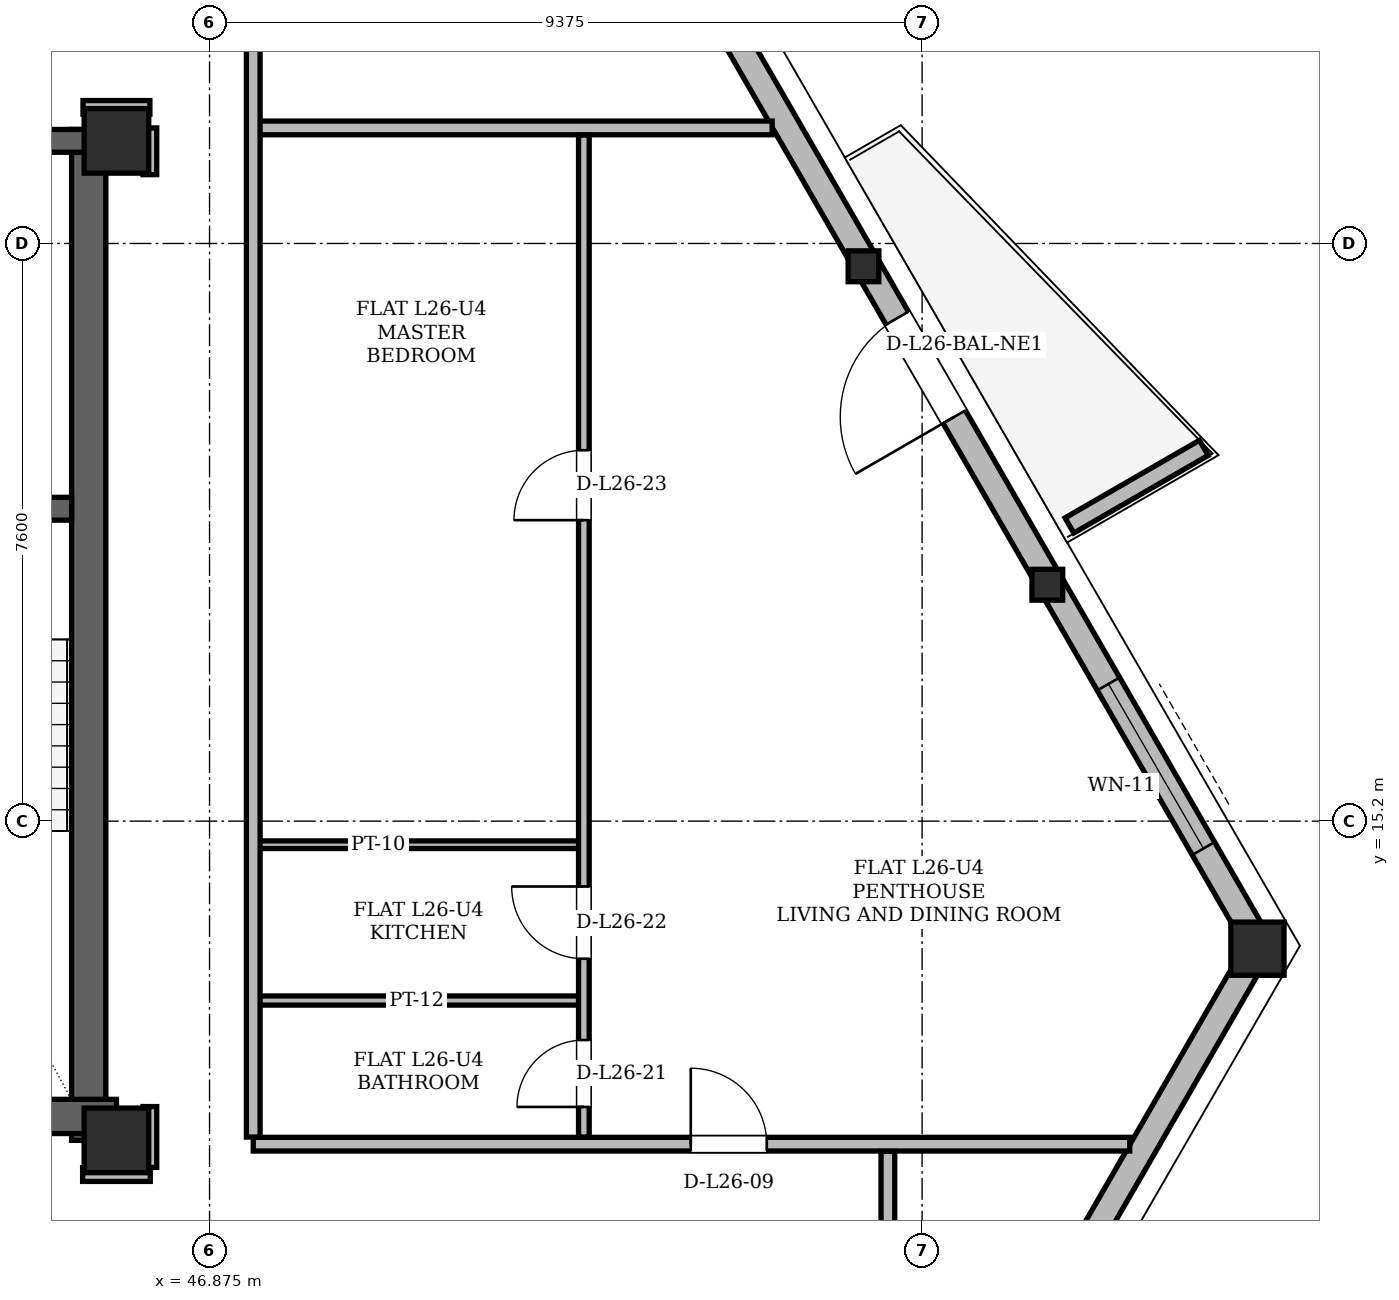
"""IFC4 building model, lengths in metres.
Left out: names, types, materials, properties, quantities, classifications, styles, units other than length and angle.
Written with IfcOpenShell. Run it as: python <this file> out.ifc"""

import sys

from ifc_helpers import new_model, si_unit, direction, frame, frame_2d, origin, origin_2d, place, context, subcontext, project, spatial, polyline, rectangle, hollow_rectangle, i_section, outline, extrude, element, fill, save


model = new_model("IFC4")
c1 = context("Model", 3, precision=1e-05, world=origin(), true_north=direction((0.0, 1.0)))
c2 = subcontext(c1, "Body", "Model", "MODEL_VIEW")
j1 = project(units=[si_unit("LENGTHUNIT", "METRE"), si_unit("PLANEANGLEUNIT", "RADIAN")], contexts=[c1])
p1 = place(None, origin())
s1 = spatial("IfcSite", under=j1, at=p1, CompositionType="ELEMENT")
p2 = place(p1, origin())
s2 = spatial("IfcBuilding", under=s1, at=p2, CompositionType="ELEMENT")
p3 = place(p2, frame((0.0, 0.0, 100.5)))
s3 = spatial("IfcBuildingStorey", under=s2, at=p3, CompositionType="ELEMENT", Elevation=100.5)
for number, where, z_axis, x_axis in (
    (1, (45.65, 11.0, 0.0), (0.0, 0.0, 1.0), (1.0, 0.0, 0.0)),
    (2, (45.65, 24.15, 0.0), (0.0, 0.0, 1.0), (1.0, 0.0, 0.0)),
):
    element("IfcColumn", number, at=place(p3, frame(where, z_axis=z_axis, x_axis=x_axis)), inside=s3, PredefinedType="COLUMN", context=c2, shape_type="SweptSolid", body=[
        extrude(hollow_rectangle(XDim=0.85, YDim=0.85, WallThickness=0.07, at=origin_2d()), origin(), (0.0, 0.0, 1.0), 3.6),
    ])
p4 = place(p3, frame((60.69, 13.561, 0.004), z_axis=(-0.015495232053, -0.021611771021, 0.999646352035), x_axis=(0.812696104859, -0.582687773295, 0.0)))
e3 = element("IfcColumn", 3, at=p4, inside=s3, PredefinedType="COLUMN", context=c2, shape_type="SweptSolid", body=[
    extrude(hollow_rectangle(XDim=0.7, YDim=0.7, WallThickness=0.055, at=origin_2d()), origin(), (0.0, 0.0, 1.0), 3.592),
])
p5 = place(p3, frame((57.929, 18.344, 0.004), z_axis=(-0.01726279285, -0.018554104126, 0.999678819023), x_axis=(0.732124530996, -0.681170809059, 0.0)))
e4 = element("IfcColumn", 4, at=p5, inside=s3, PredefinedType="COLUMN", context=c2, shape_type="SweptSolid", body=[
    extrude(i_section(OverallWidth=0.404, OverallDepth=0.406, WebThickness=0.027, FlangeThickness=0.044, at=origin_2d()), origin(), (0.0, 0.0, 1.0), 3.592),
])
p6 = place(p3, frame((55.513, 22.528, 0.004), z_axis=(-0.018758346864, -0.015903815819, 0.999697550795), x_axis=(0.646685251635, -0.762756963467, 0.0)))
e5 = element("IfcColumn", 5, at=p6, inside=s3, PredefinedType="COLUMN", context=c2, shape_type="SweptSolid", body=[
    extrude(i_section(OverallWidth=0.404, OverallDepth=0.406, WebThickness=0.027, FlangeThickness=0.044, at=origin_2d()), origin(), (0.0, 0.0, 1.0), 3.592),
])
p7 = place(p3, frame((45.285, 11.0, 0.0), z_axis=(0.0, 0.0, 1.0), x_axis=(0.0, 1.0, 0.0)))
e6 = element("IfcWall", 6, at=p7, inside=s3, PredefinedType="SHEAR", context=c2, shape_type="SweptSolid", body=[
    extrude(rectangle(XDim=13.3, YDim=0.45, at=frame_2d((6.65, 0.0))), origin(), (0.0, 0.0, 1.0), 3.36),
])
p8 = place(p3, frame((38.55, 11.315, 0.0), z_axis=(0.0, 0.0, 1.0), x_axis=(1.0, 0.0, 0.0)))
e7 = element("IfcWall", 7, at=p8, inside=s3, PredefinedType="SHEAR", context=c2, shape_type="SweptSolid", body=[
    extrude(rectangle(XDim=7.1, YDim=0.45, at=frame_2d((3.55, 0.0))), origin(), (0.0, 0.0, 1.0), 3.36),
])
p9 = place(p3, frame((29.65, 24.15, 0.0), z_axis=(0.0, 0.0, 1.0), x_axis=(1.0, 0.0, 0.0)))
e8 = element("IfcWall", 8, at=p9, inside=s3, PredefinedType="SHEAR", context=c2, shape_type="SweptSolid", body=[
    extrude(rectangle(XDim=15.7, YDim=0.3, at=frame_2d((7.85, 0.0))), origin(), (0.0, 0.0, 1.0), 3.36),
])
p10 = place(p9, frame((1.7, 0.0, 0.0)))
e9 = element("IfcOpeningElement", 9, at=p10, cuts=e8, PredefinedType="OPENING", context=c2, shape_type="SweptSolid", body=[
    extrude(rectangle(XDim=1.2, YDim=2.2, at=frame_2d((0.6, 1.1))), frame((0.0, 0.15, 0.0), z_axis=(0.0, -1.0, 0.0), x_axis=(1.0, 0.0, 0.0)), (0.0, 0.0, 1.0), 0.3),
])
p11 = place(p9, frame((12.8, 0.0, 0.0)))
e10 = element("IfcOpeningElement", 10, at=p11, cuts=e8, PredefinedType="OPENING", context=c2, shape_type="SweptSolid", body=[
    extrude(rectangle(XDim=1.2, YDim=2.2, at=frame_2d((0.6, 1.1))), frame((0.0, 0.15, 0.0), z_axis=(0.0, -1.0, 0.0), x_axis=(1.0, 0.0, 0.0)), (0.0, 0.0, 1.0), 0.3),
])
p12 = place(p9, frame((7.4, 0.0, 0.0)))
e11 = element("IfcOpeningElement", 11, at=p12, cuts=e8, PredefinedType="OPENING", context=c2, shape_type="SweptSolid", body=[
    extrude(rectangle(XDim=0.9, YDim=2.05, at=frame_2d((0.45, 1.025))), frame((0.0, 0.15, 0.0), z_axis=(0.0, -1.0, 0.0), x_axis=(1.0, 0.0, 0.0)), (0.0, 0.0, 1.0), 0.3),
])
p13 = place(p3, frame((41.05, 19.31, 0.0), z_axis=(0.0, 0.0, 1.0), x_axis=(1.0, 0.0, 0.0)))
e12 = element("IfcWall", 12, at=p13, inside=s3, PredefinedType="SHEAR", context=c2, shape_type="SweptSolid", body=[
    extrude(rectangle(XDim=4.01, YDim=0.3, at=frame_2d((2.005, 0.0))), origin(), (0.0, 0.0, 1.0), 3.36),
])
p14 = place(p13, frame((1.6, 0.0, 0.0)))
e13 = element("IfcOpeningElement", 13, at=p14, cuts=e12, PredefinedType="OPENING", context=c2, shape_type="SweptSolid", body=[
    extrude(rectangle(XDim=1.4, YDim=2.2, at=frame_2d((0.7, 1.1))), frame((0.0, 0.15, 0.0), z_axis=(0.0, -1.0, 0.0), x_axis=(1.0, 0.0, 0.0)), (0.0, 0.0, 1.0), 0.3),
])
p15 = place(p3, frame((54.758, 3.286, 0.0), z_axis=(0.0, 0.0, 1.0), x_axis=(0.4999967785, 0.866027263711, 0.0)))
e14 = element("IfcWall", 14, at=p15, inside=s3, PredefinedType="SOLIDWALL", context=c2, shape_type="SweptSolid", body=[
    extrude(rectangle(XDim=11.864, YDim=0.34, at=frame_2d((5.932, 0.0))), origin(), (0.0, 0.0, 1.0), 2.578),
])
p16 = place(p3, frame((60.69, 13.561, 0.0), z_axis=(0.0, 0.0, 1.0), x_axis=(-0.500002056916, 0.86602421622, 0.0)))
e15 = element("IfcWall", 15, at=p16, inside=s3, PredefinedType="SOLIDWALL", context=c2, shape_type="SweptSolid", body=[
    extrude(rectangle(XDim=34.516, YDim=0.34, at=frame_2d((17.258, 0.0))), origin(), (0.0, 0.0, 1.0), 2.578),
])
p17 = place(p16, frame((8.034, 0.0, 0.0)))
e16 = element("IfcOpeningElement", 16, at=p17, cuts=e15, PredefinedType="OPENING", context=c2, shape_type="SweptSolid", body=[
    extrude(rectangle(XDim=1.5, YDim=2.2, at=frame_2d((0.75, 1.1))), frame((0.0, 0.17, 0.0), z_axis=(0.0, -1.0, 0.0), x_axis=(1.0, 0.0, 0.0)), (0.0, 0.0, 1.0), 0.34),
])
p18 = place(p16, frame((26.647, 0.0, 0.0)))
e17 = element("IfcOpeningElement", 17, at=p18, cuts=e15, PredefinedType="OPENING", context=c2, shape_type="SweptSolid", body=[
    extrude(rectangle(XDim=1.5, YDim=2.2, at=frame_2d((0.75, 1.1))), frame((0.0, 0.17, 0.0), z_axis=(0.0, -1.0, 0.0), x_axis=(1.0, 0.0, 0.0)), (0.0, 0.0, 1.0), 0.34),
])
p19 = place(p16, frame((1.477, 0.0, 0.85)))
e18 = element("IfcOpeningElement", 18, at=p19, cuts=e15, PredefinedType="OPENING", context=c2, shape_type="SweptSolid", body=[
    extrude(rectangle(XDim=2.5, YDim=1.618, at=frame_2d((1.25, 0.809))), frame((0.0, 0.17, 0.0), z_axis=(0.0, -1.0, 0.0), x_axis=(1.0, 0.0, 0.0)), (0.0, 0.0, 1.0), 0.34),
])
p20 = place(p16, frame((16.107, 0.0, 0.85)))
e19 = element("IfcOpeningElement", 19, at=p20, cuts=e15, PredefinedType="OPENING", context=c2, shape_type="SweptSolid", body=[
    extrude(rectangle(XDim=1.4, YDim=1.6, at=frame_2d((0.7, 0.8))), frame((0.0, 0.17, 0.0), z_axis=(0.0, -1.0, 0.0), x_axis=(1.0, 0.0, 0.0)), (0.0, 0.0, 1.0), 0.34),
])
p21 = place(p16, frame((30.693, 0.0, 0.85)))
e20 = element("IfcOpeningElement", 20, at=p21, cuts=e15, PredefinedType="OPENING", context=c2, shape_type="SweptSolid", body=[
    extrude(rectangle(XDim=2.5, YDim=1.618, at=frame_2d((1.25, 0.809))), frame((0.0, 0.17, 0.0), z_axis=(0.0, -1.0, 0.0), x_axis=(1.0, 0.0, 0.0)), (0.0, 0.0, 1.0), 0.34),
])
p22 = place(p3, frame((58.188, 19.09, 0.0), z_axis=(0.0, 0.0, 1.0), x_axis=(0.866012356593, 0.500022597718, 0.0)))
e21 = element("IfcWall", 21, at=p22, inside=s3, PredefinedType="PARAPET", context=c2, shape_type="SweptSolid", body=[
    extrude(outline(polyline([(0.0, 0.0), (2.042, 0.0), (2.042, 1.1), (0.0, 1.32), (0.0, 0.0)])), frame((0.0, 0.115, 0.0), z_axis=(0.0, -1.0, 0.0), x_axis=(1.0, 0.0, 0.0)), (0.0, 0.0, 1.0), 0.23),
])
p23 = place(p3, frame((45.205, 10.55, 0.0), z_axis=(0.0, 0.0, 1.0), x_axis=(1.0, 0.0, 0.0)))
e22 = element("IfcWall", 22, at=p23, inside=s3, PredefinedType="PARTITIONING", context=c2, shape_type="SweptSolid", body=[
    extrude(rectangle(XDim=0.89, YDim=0.18, at=frame_2d((0.445, 0.0))), origin(), (0.0, 0.0, 1.0), 3.36),
])
p24 = place(p3, frame((47.45, 10.95, 0.0), z_axis=(0.0, 0.0, 1.0), x_axis=(1.0, 0.0, 0.0)))
e23 = element("IfcWall", 23, at=p24, inside=s3, PredefinedType="PARTITIONING", context=c2, shape_type="SweptSolid", body=[
    extrude(rectangle(XDim=11.532, YDim=0.18, at=frame_2d((5.766, 0.0))), origin(), (0.0, 0.0, 1.0), 3.36),
])
p25 = place(p24, frame((5.756, 0.0, 0.0)))
e24 = element("IfcOpeningElement", 24, at=p25, cuts=e23, PredefinedType="OPENING", context=c2, shape_type="SweptSolid", body=[
    extrude(rectangle(XDim=1.0, YDim=2.18, at=frame_2d((0.5, 1.09))), frame((0.0, 0.09, 0.0), z_axis=(0.0, -1.0, 0.0), x_axis=(1.0, 0.0, 0.0)), (0.0, 0.0, 1.0), 0.18),
])
p26 = place(p3, frame((47.4, 12.84, 0.0), z_axis=(0.0, 0.0, 1.0), x_axis=(1.0, 0.0, 0.0)))
e25 = element("IfcWall", 25, at=p26, inside=s3, PredefinedType="PARTITIONING", context=c2, shape_type="SweptSolid", body=[
    extrude(rectangle(XDim=4.4, YDim=0.12, at=frame_2d((2.2, 0.0))), origin(), (0.0, 0.0, 1.0), 3.36),
])
p27 = place(p3, frame((47.4, 14.89, 0.0), z_axis=(0.0, 0.0, 1.0), x_axis=(1.0, 0.0, 0.0)))
e26 = element("IfcWall", 26, at=p27, inside=s3, PredefinedType="PARTITIONING", context=c2, shape_type="SweptSolid", body=[
    extrude(rectangle(XDim=4.4, YDim=0.1, at=frame_2d((2.2, 0.0))), origin(), (0.0, 0.0, 1.0), 2.946),
])
p28 = place(p3, frame((47.45, 24.32, 0.0), z_axis=(0.0, 0.0, 1.0), x_axis=(1.0, 0.0, 0.0)))
e27 = element("IfcWall", 27, at=p28, inside=s3, PredefinedType="PARTITIONING", context=c2, shape_type="SweptSolid", body=[
    extrude(rectangle(XDim=6.827, YDim=0.18, at=frame_2d((3.414, 0.0))), origin(), (0.0, 0.0, 1.0), 3.36),
])
p29 = place(p3, frame((45.21, 24.59, 0.0), z_axis=(0.0, 0.0, 1.0), x_axis=(1.0, 0.0, 0.0)))
e28 = element("IfcWall", 28, at=p29, inside=s3, PredefinedType="PARTITIONING", context=c2, shape_type="SweptSolid", body=[
    extrude(rectangle(XDim=0.88, YDim=0.18, at=frame_2d((0.44, 0.0))), origin(), (0.0, 0.0, 1.0), 2.814),
])
p30 = place(p3, frame((46.09, 10.644, 0.0), z_axis=(0.0, 0.0, 1.0), x_axis=(0.0, 1.0, 0.0)))
e29 = element("IfcWall", 29, at=p30, inside=s3, PredefinedType="PARTITIONING", context=c2, shape_type="SweptSolid", body=[
    extrude(rectangle(XDim=0.801, YDim=0.18, at=frame_2d((0.4, 0.0))), origin(), (0.0, 0.0, 1.0), 2.814),
])
p31 = place(p3, frame((46.09, 23.705, 0.0), z_axis=(0.0, 0.0, 1.0), x_axis=(0.0, 1.0, 0.0)))
e30 = element("IfcWall", 30, at=p31, inside=s3, PredefinedType="PARTITIONING", context=c2, shape_type="SweptSolid", body=[
    extrude(rectangle(XDim=0.615, YDim=0.18, at=frame_2d((0.308, 0.0))), origin(), (0.0, 0.0, 1.0), 2.946),
])
p32 = place(p3, frame((47.45, 11.044, 0.0), z_axis=(0.0, 0.0, 1.0), x_axis=(0.0, 1.0, 0.0)))
e31 = element("IfcWall", 31, at=p32, inside=s3, PredefinedType="PARTITIONING", context=c2, shape_type="SweptSolid", body=[
    extrude(rectangle(XDim=14.832, YDim=0.18, at=frame_2d((7.416, 0.0))), origin(), (0.0, 0.0, 1.0), 2.814),
])
p33 = place(p3, frame((51.8, 11.044, 0.0), z_axis=(0.0, 0.0, 1.0), x_axis=(0.0, 1.0, 0.0)))
e32 = element("IfcWall", 32, at=p33, inside=s3, PredefinedType="PARTITIONING", context=c2, shape_type="SweptSolid", body=[
    extrude(rectangle(XDim=13.182, YDim=0.14, at=frame_2d((6.591, 0.0))), origin(), (0.0, 0.0, 1.0), 2.814),
])
p34 = place(p33, frame((0.396, 0.0, 0.0)))
e33 = element("IfcOpeningElement", 33, at=p34, cuts=e32, PredefinedType="OPENING", context=c2, shape_type="SweptSolid", body=[
    extrude(rectangle(XDim=0.88, YDim=2.08, at=frame_2d((0.44, 1.04))), frame((0.0, 0.07, 0.0), z_axis=(0.0, -1.0, 0.0), x_axis=(1.0, 0.0, 0.0)), (0.0, 0.0, 1.0), 0.14),
])
p35 = place(p33, frame((2.346, 0.0, 0.0)))
e34 = element("IfcOpeningElement", 34, at=p35, cuts=e32, PredefinedType="OPENING", context=c2, shape_type="SweptSolid", body=[
    extrude(rectangle(XDim=0.95, YDim=2.1, at=frame_2d((0.475, 1.05))), frame((0.0, 0.07, 0.0), z_axis=(0.0, -1.0, 0.0), x_axis=(1.0, 0.0, 0.0)), (0.0, 0.0, 1.0), 0.14),
])
p36 = place(p33, frame((8.116, 0.0, 0.0)))
e35 = element("IfcOpeningElement", 35, at=p36, cuts=e32, PredefinedType="OPENING", context=c2, shape_type="SweptSolid", body=[
    extrude(rectangle(XDim=0.92, YDim=2.12, at=frame_2d((0.46, 1.06))), frame((0.0, 0.07, 0.0), z_axis=(0.0, -1.0, 0.0), x_axis=(1.0, 0.0, 0.0)), (0.0, 0.0, 1.0), 0.14),
])
p37 = place(p3, frame((55.8, 9.394, 0.0), z_axis=(0.0, 0.0, 1.0), x_axis=(0.0, 1.0, 0.0)))
e36 = element("IfcWall", 36, at=p37, inside=s3, PredefinedType="PARTITIONING", context=c2, shape_type="SweptSolid", body=[
    extrude(rectangle(XDim=1.462, YDim=0.18, at=frame_2d((0.731, 0.0))), origin(), (0.0, 0.0, 1.0), 3.36),
])
p38 = place(p17, origin())
e37 = element("IfcDoor", 37, at=p38, inside=s3, OperationType="SINGLE_SWING_LEFT", PredefinedType="DOOR", context=c2, shape_type="SweptSolid", body=[
    extrude(rectangle(XDim=1.5, YDim=2.2, at=frame_2d((0.75, 1.1))), frame((0.0, 0.025, 0.0), z_axis=(0.0, -1.0, 0.0), x_axis=(1.0, 0.0, 0.0)), (0.0, 0.0, 1.0), 0.05),
])
fill(e16, e37)
p39 = place(p19, origin())
e38 = element("IfcWindow", 38, at=p39, inside=s3, PartitioningType="SINGLE_PANEL", PredefinedType="WINDOW", context=c2, shape_type="SweptSolid", body=[
    extrude(rectangle(XDim=2.5, YDim=1.618, at=frame_2d((1.25, 0.809))), frame((0.0, 0.03, 0.0), z_axis=(0.0, -1.0, 0.0), x_axis=(1.0, 0.0, 0.0)), (0.0, 0.0, 1.0), 0.06),
])
fill(e18, e38)
p40 = place(p25, origin())
e39 = element("IfcDoor", 39, at=p40, inside=s3, OperationType="SINGLE_SWING_LEFT", PredefinedType="DOOR", context=c2, shape_type="SweptSolid", body=[
    extrude(rectangle(XDim=1.0, YDim=2.18, at=frame_2d((0.5, 1.09))), frame((0.0, 0.025, 0.0), z_axis=(0.0, -1.0, 0.0), x_axis=(1.0, 0.0, 0.0)), (0.0, 0.0, 1.0), 0.05),
])
fill(e24, e39)
p41 = place(p34, origin())
e40 = element("IfcDoor", 40, at=p41, inside=s3, OperationType="SINGLE_SWING_LEFT", PredefinedType="DOOR", context=c2, shape_type="SweptSolid", body=[
    extrude(rectangle(XDim=0.88, YDim=2.08, at=frame_2d((0.44, 1.04))), frame((0.0, 0.025, 0.0), z_axis=(0.0, -1.0, 0.0), x_axis=(1.0, 0.0, 0.0)), (0.0, 0.0, 1.0), 0.05),
])
fill(e33, e40)
p42 = place(p35, origin())
e41 = element("IfcDoor", 41, at=p42, inside=s3, OperationType="SINGLE_SWING_RIGHT", PredefinedType="DOOR", context=c2, shape_type="SweptSolid", body=[
    extrude(rectangle(XDim=0.95, YDim=2.1, at=frame_2d((0.475, 1.05))), frame((0.0, 0.025, 0.0), z_axis=(0.0, -1.0, 0.0), x_axis=(1.0, 0.0, 0.0)), (0.0, 0.0, 1.0), 0.05),
])
fill(e34, e41)
p43 = place(p36, origin())
e42 = element("IfcDoor", 42, at=p43, inside=s3, OperationType="SINGLE_SWING_LEFT", PredefinedType="DOOR", context=c2, shape_type="SweptSolid", body=[
    extrude(rectangle(XDim=0.92, YDim=2.12, at=frame_2d((0.46, 1.06))), frame((0.0, 0.025, 0.0), z_axis=(0.0, -1.0, 0.0), x_axis=(1.0, 0.0, 0.0)), (0.0, 0.0, 1.0), 0.05),
])
fill(e35, e42)
save(model, sys.argv[1])
